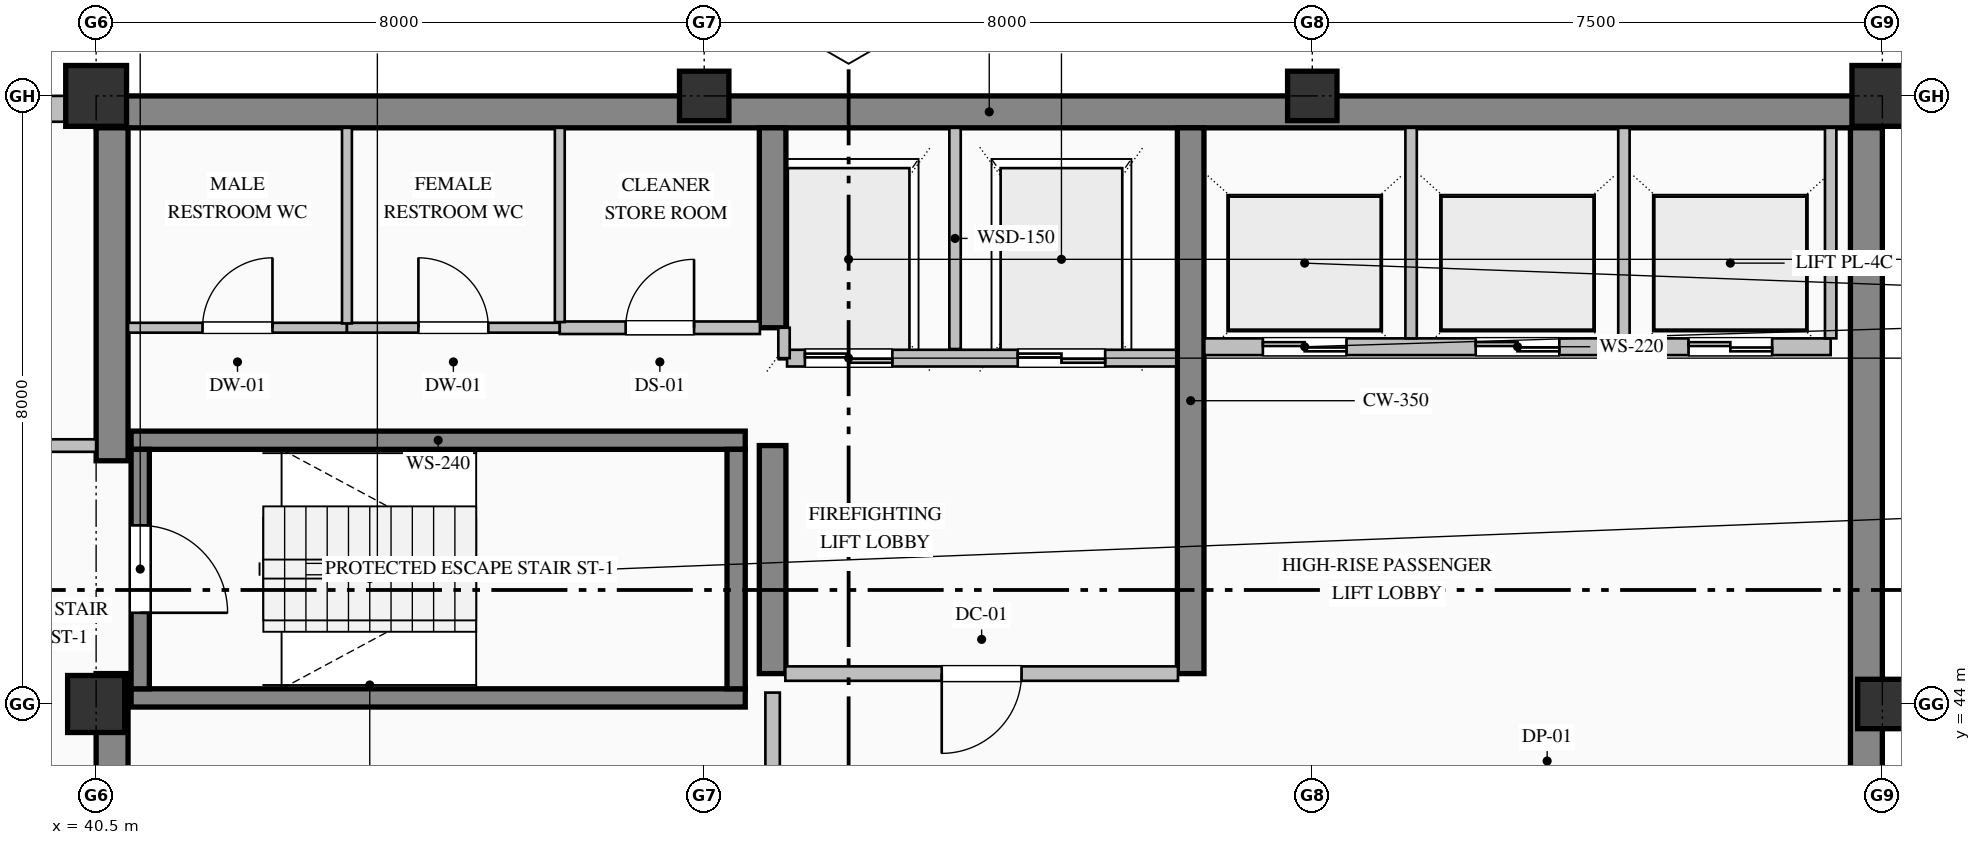
"""IFC4 building model, lengths in metres.
Left out: names, types, materials, properties, quantities, classifications, styles, units other than length and angle.
Written with IfcOpenShell. Run it as: python <this file> out.ifc"""

import sys

from ifc_helpers import new_model, si_unit, direction, frame, frame_2d, origin, origin_2d, place, context, subcontext, project, spatial, rectangle, hollow_rectangle, extrude, element, fill, save


model = new_model("IFC4")
c1 = context("Model", 3, precision=1e-05, world=origin(), true_north=direction((0.0, 1.0)))
c2 = subcontext(c1, "Body", "Model", "MODEL_VIEW")
j1 = project(units=[si_unit("LENGTHUNIT", "METRE"), si_unit("PLANEANGLEUNIT", "RADIAN")], contexts=[c1])
p1 = place(None, origin())
s1 = spatial("IfcSite", under=j1, at=p1, CompositionType="ELEMENT")
p2 = place(p1, origin())
s2 = spatial("IfcBuilding", under=s1, at=p2, CompositionType="ELEMENT")
p3 = place(p2, frame((0.0, 0.0, 287.2)))
s3 = spatial("IfcBuildingStorey", under=s2, at=p3, CompositionType="ELEMENT", Elevation=287.2)
p4 = place(p3, frame((40.5, 51.79, 0.0), z_axis=(0.0, 0.0, 1.0), x_axis=(1.0, 0.0, 0.0)))
e1 = element("IfcWall", 1, at=p4, inside=s3, PredefinedType="SHEAR", context=c2, shape_type="SweptSolid", body=[
    extrude(rectangle(XDim=23.5, YDim=0.42, at=frame_2d((11.75, 0.0))), origin(), (0.0, 0.0, 1.0), 3.785),
])
p5 = place(p3, frame((63.79, 36.32, 0.0), z_axis=(0.0, 0.0, 1.0), x_axis=(0.0, 1.0, 0.0)))
e2 = element("IfcWall", 2, at=p5, inside=s3, PredefinedType="SHEAR", context=c2, shape_type="SweptSolid", body=[
    extrude(rectangle(XDim=15.26, YDim=0.42, at=frame_2d((7.63, 0.0))), origin(), (0.0, 0.0, 1.0), 3.785),
])
p6 = place(p3, frame((40.71, 36.42, 0.0), z_axis=(0.0, 0.0, 1.0), x_axis=(0.0, 1.0, 0.0)))
e3 = element("IfcWall", 3, at=p6, inside=s3, PredefinedType="SHEAR", context=c2, shape_type="SweptSolid", body=[
    extrude(rectangle(XDim=7.98, YDim=0.42, at=frame_2d((3.99, 0.0))), origin(), (0.0, 0.0, 1.0), 3.785),
])
p7 = place(p3, frame((40.71, 47.2, 0.0), z_axis=(0.0, 0.0, 1.0), x_axis=(0.0, 1.0, 0.0)))
e4 = element("IfcWall", 4, at=p7, inside=s3, PredefinedType="SHEAR", context=c2, shape_type="SweptSolid", body=[
    extrude(rectangle(XDim=4.38, YDim=0.42, at=frame_2d((2.19, 0.0))), origin(), (0.0, 0.0, 1.0), 3.785),
])
p8 = place(p3, frame((49.4, 44.4, 0.0), z_axis=(0.0, 0.0, 1.0), x_axis=(0.0, 1.0, 0.0)))
e5 = element("IfcWall", 5, at=p8, inside=s3, PredefinedType="SHEAR", context=c2, shape_type="SweptSolid", body=[
    extrude(rectangle(XDim=3.0, YDim=0.35, at=frame_2d((1.5, 0.0))), origin(), (0.0, 0.0, 1.0), 3.785),
])
p9 = place(p3, frame((49.4, 48.95, 0.0), z_axis=(0.0, 0.0, 1.0), x_axis=(0.0, 1.0, 0.0)))
e6 = element("IfcWall", 6, at=p9, inside=s3, PredefinedType="SHEAR", context=c2, shape_type="SweptSolid", body=[
    extrude(rectangle(XDim=2.63, YDim=0.35, at=frame_2d((1.315, 0.0))), origin(), (0.0, 0.0, 1.0), 3.785),
])
p10 = place(p3, frame((54.9, 44.4, 0.0), z_axis=(0.0, 0.0, 1.0), x_axis=(0.0, 1.0, 0.0)))
e7 = element("IfcWall", 7, at=p10, inside=s3, PredefinedType="SHEAR", context=c2, shape_type="SweptSolid", body=[
    extrude(rectangle(XDim=7.18, YDim=0.35, at=frame_2d((3.59, 0.0))), origin(), (0.0, 0.0, 1.0), 3.785),
])
p11 = place(p3, frame((40.5, 44.0, 0.0), z_axis=(0.0, 0.0, 1.0), x_axis=(1.0, 0.0, 0.0)))
e8 = element("IfcColumn", 8, at=p11, inside=s3, PredefinedType="COLUMN", context=c2, shape_type="SweptSolid", body=[
    extrude(rectangle(XDim=0.75, YDim=0.75, at=origin_2d()), origin(), (0.0, 0.0, 1.0), 4.0),
])
p12 = place(p3, frame((40.5, 52.0, 0.0), z_axis=(0.0, 0.0, 1.0), x_axis=(1.0, 0.0, 0.0)))
e9 = element("IfcColumn", 9, at=p12, inside=s3, PredefinedType="COLUMN", context=c2, shape_type="SweptSolid", body=[
    extrude(hollow_rectangle(XDim=0.8, YDim=0.8, WallThickness=0.032, at=origin_2d()), origin(), (0.0, 0.0, 1.0), 4.0),
])
for number, where, z_axis, x_axis in (
    (10, (48.5, 52.0, 0.0), (0.0, 0.0, 1.0), (1.0, 0.0, 0.0)),
    (11, (56.5, 52.0, 0.0), (0.0, 0.0, 1.0), (1.0, 0.0, 0.0)),
    (12, (64.0, 44.0, 0.0), (0.0, 0.0, 1.0), (1.0, 0.0, 0.0)),
):
    element("IfcColumn", number, at=place(p3, frame(where, z_axis=z_axis, x_axis=x_axis)), inside=s3, PredefinedType="COLUMN", context=c2, shape_type="SweptSolid", body=[
        extrude(hollow_rectangle(XDim=0.65, YDim=0.65, WallThickness=0.028, at=origin_2d()), origin(), (0.0, 0.0, 1.0), 4.0),
    ])
p13 = place(p3, frame((64.0, 52.0, 0.0), z_axis=(0.0, 0.0, 1.0), x_axis=(1.0, 0.0, 0.0)))
e13 = element("IfcColumn", 13, at=p13, inside=s3, PredefinedType="COLUMN", context=c2, shape_type="SweptSolid", body=[
    extrude(hollow_rectangle(XDim=0.8, YDim=0.8, WallThickness=0.032, at=origin_2d()), origin(), (0.0, 0.0, 1.0), 4.0),
])
p14 = place(p3, frame((20.5, 51.83, 0.0), z_axis=(0.0, 0.0, 1.0), x_axis=(1.0, 0.0, 0.0)))
e14 = element("IfcWall", 14, at=p14, inside=s3, PredefinedType="SOLIDWALL", context=c2, shape_type="SweptSolid", body=[
    extrude(rectangle(XDim=20.02, YDim=0.34, at=frame_2d((10.01, 0.0))), origin(), (0.0, 0.0, 1.0), 3.335),
])
p15 = place(p14, frame((6.725, 0.0, 0.9)))
e15 = element("IfcOpeningElement", 15, at=p15, cuts=e14, PredefinedType="OPENING", context=c2, shape_type="SweptSolid", body=[
    extrude(rectangle(XDim=0.95, YDim=1.85, at=frame_2d((0.475, 0.925))), frame((0.0, 0.18, 0.0), z_axis=(0.0, -1.0, 0.0), x_axis=(1.0, 0.0, 0.0)), (0.0, 0.0, 1.0), 0.36),
])
for number, where, z_axis, x_axis in (
    (16, (40.96, 47.47, 0.0), (0.0, 0.0, 1.0), (1.0, 0.0, 0.0)),
    (17, (49.04, 44.08, 0.0), (0.0, 0.0, 1.0), (-1.0, 0.0, 0.0)),
):
    element("IfcWall", number, at=place(p3, frame(where, z_axis=z_axis, x_axis=x_axis)), inside=s3, PredefinedType="SOLIDWALL", context=c2, shape_type="SweptSolid", body=[
        extrude(rectangle(XDim=8.08, YDim=0.24, at=frame_2d((4.04, 0.0))), origin(), (0.0, 0.0, 1.0), 4.0),
    ])
p16 = place(p3, frame((41.08, 47.35, 0.0), z_axis=(0.0, 0.0, 1.0), x_axis=(0.0, -1.0, 0.0)))
e18 = element("IfcWall", 18, at=p16, inside=s3, PredefinedType="SOLIDWALL", context=c2, shape_type="SweptSolid", body=[
    extrude(rectangle(XDim=3.15, YDim=0.24, at=frame_2d((1.575, 0.0))), origin(), (0.0, 0.0, 1.0), 4.0),
])
p17 = place(p16, frame((1.0, 0.0, 0.0)))
e19 = element("IfcOpeningElement", 19, at=p17, cuts=e18, PredefinedType="OPENING", context=c2, shape_type="SweptSolid", body=[
    extrude(rectangle(XDim=1.15, YDim=2.2, at=frame_2d((0.575, 1.1))), frame((0.0, 0.13, 0.0), z_axis=(0.0, -1.0, 0.0), x_axis=(1.0, 0.0, 0.0)), (0.0, 0.0, 1.0), 0.26),
])
p18 = place(p3, frame((48.92, 44.2, 0.0), z_axis=(0.0, 0.0, 1.0), x_axis=(0.0, 1.0, 0.0)))
e20 = element("IfcWall", 20, at=p18, inside=s3, PredefinedType="SOLIDWALL", context=c2, shape_type="SweptSolid", body=[
    extrude(rectangle(XDim=3.15, YDim=0.24, at=frame_2d((1.575, 0.0))), origin(), (0.0, 0.0, 1.0), 4.0),
])
p19 = place(p3, frame((54.71, 48.55, 0.0), z_axis=(0.0, 0.0, 1.0), x_axis=(-1.0, 0.0, 0.0)))
e21 = element("IfcWall", 21, at=p19, inside=s3, PredefinedType="PARTITIONING", context=c2, shape_type="SweptSolid", body=[
    extrude(rectangle(XDim=5.12, YDim=0.22, at=frame_2d((2.56, 0.0))), origin(), (0.0, 0.0, 1.0), 3.785),
])
p20 = place(p19, frame((3.735, 0.0, 0.0)))
e22 = element("IfcOpeningElement", 22, at=p20, cuts=e21, PredefinedType="OPENING", context=c2, shape_type="SweptSolid", body=[
    extrude(rectangle(XDim=1.15, YDim=2.2, at=frame_2d((0.575, 1.1))), frame((0.0, 0.12, 0.0), z_axis=(0.0, -1.0, 0.0), x_axis=(1.0, 0.0, 0.0)), (0.0, 0.0, 1.0), 0.24),
])
p21 = place(p19, frame((0.935, 0.0, 0.0)))
e23 = element("IfcOpeningElement", 23, at=p21, cuts=e21, PredefinedType="OPENING", context=c2, shape_type="SweptSolid", body=[
    extrude(rectangle(XDim=1.15, YDim=2.2, at=frame_2d((0.575, 1.1))), frame((0.0, 0.12, 0.0), z_axis=(0.0, -1.0, 0.0), x_axis=(1.0, 0.0, 0.0)), (0.0, 0.0, 1.0), 0.24),
])
p22 = place(p3, frame((51.8, 48.67, 0.0), z_axis=(0.0, 0.0, 1.0), x_axis=(0.0, 1.0, 0.0)))
e24 = element("IfcWall", 24, at=p22, inside=s3, PredefinedType="PARTITIONING", context=c2, shape_type="SweptSolid", body=[
    extrude(rectangle(XDim=2.91, YDim=0.15, at=frame_2d((1.455, 0.0))), origin(), (0.0, 0.0, 1.0), 3.785),
])
p23 = place(p3, frame((49.55, 48.55, 0.0), z_axis=(0.0, 0.0, 1.0), x_axis=(0.0, 1.0, 0.0)))
e25 = element("IfcWall", 25, at=p23, inside=s3, PredefinedType="PARTITIONING", context=c2, shape_type="SweptSolid", body=[
    extrude(rectangle(XDim=0.4, YDim=0.15, at=frame_2d((0.2, 0.0))), origin(), (0.0, 0.0, 1.0), 3.785),
])
p24 = place(p3, frame((63.32, 48.7, 0.0), z_axis=(0.0, 0.0, 1.0), x_axis=(-1.0, 0.0, 0.0)))
e26 = element("IfcWall", 26, at=p24, inside=s3, PredefinedType="PARTITIONING", context=c2, shape_type="SweptSolid", body=[
    extrude(rectangle(XDim=8.24, YDim=0.22, at=frame_2d((4.12, 0.0))), origin(), (0.0, 0.0, 1.0), 3.785),
])
p25 = place(p24, frame((6.37, 0.0, 0.0)))
e27 = element("IfcOpeningElement", 27, at=p25, cuts=e26, PredefinedType="OPENING", context=c2, shape_type="SweptSolid", body=[
    extrude(rectangle(XDim=1.1, YDim=2.2, at=frame_2d((0.55, 1.1))), frame((0.0, 0.12, 0.0), z_axis=(0.0, -1.0, 0.0), x_axis=(1.0, 0.0, 0.0)), (0.0, 0.0, 1.0), 0.24),
])
p26 = place(p24, frame((3.57, 0.0, 0.0)))
e28 = element("IfcOpeningElement", 28, at=p26, cuts=e26, PredefinedType="OPENING", context=c2, shape_type="SweptSolid", body=[
    extrude(rectangle(XDim=1.1, YDim=2.2, at=frame_2d((0.55, 1.1))), frame((0.0, 0.12, 0.0), z_axis=(0.0, -1.0, 0.0), x_axis=(1.0, 0.0, 0.0)), (0.0, 0.0, 1.0), 0.24),
])
p27 = place(p24, frame((0.77, 0.0, 0.0)))
e29 = element("IfcOpeningElement", 29, at=p27, cuts=e26, PredefinedType="OPENING", context=c2, shape_type="SweptSolid", body=[
    extrude(rectangle(XDim=1.1, YDim=2.2, at=frame_2d((0.55, 1.1))), frame((0.0, 0.12, 0.0), z_axis=(0.0, -1.0, 0.0), x_axis=(1.0, 0.0, 0.0)), (0.0, 0.0, 1.0), 0.24),
])
for number, where, z_axis, x_axis in (
    (30, (57.8, 48.81, 0.0), (0.0, 0.0, 1.0), (0.0, 1.0, 0.0)),
    (31, (60.6, 48.81, 0.0), (0.0, 0.0, 1.0), (0.0, 1.0, 0.0)),
    (32, (63.32, 48.81, 0.0), (0.0, 0.0, 1.0), (0.0, 1.0, 0.0)),
):
    element("IfcWall", number, at=place(p3, frame(where, z_axis=z_axis, x_axis=x_axis)), inside=s3, PredefinedType="PARTITIONING", context=c2, shape_type="SweptSolid", body=[
        extrude(rectangle(XDim=2.77, YDim=0.15, at=frame_2d((1.385, 0.0))), origin(), (0.0, 0.0, 1.0), 3.785),
    ])
p28 = place(p3, frame((37.8, 47.4, 0.0), z_axis=(0.0, 0.0, 1.0), x_axis=(1.0, 0.0, 0.0)))
e33 = element("IfcWall", 33, at=p28, inside=s3, PredefinedType="PARTITIONING", context=c2, shape_type="SweptSolid", body=[
    extrude(rectangle(XDim=2.7, YDim=0.165, at=frame_2d((1.35, 0.0))), origin(), (0.0, 0.0, 1.0), 3.785),
])
p29 = place(p28, frame((0.825, 0.0, 0.0)))
e34 = element("IfcOpeningElement", 34, at=p29, cuts=e33, PredefinedType="OPENING", context=c2, shape_type="SweptSolid", body=[
    extrude(rectangle(XDim=1.05, YDim=2.15, at=frame_2d((0.525, 1.075))), frame((0.0, 0.093, 0.0), z_axis=(0.0, -1.0, 0.0), x_axis=(1.0, 0.0, 0.0)), (0.0, 0.0, 1.0), 0.185),
])
p30 = place(p3, frame((40.92, 48.95, 0.0), z_axis=(0.0, 0.0, 1.0), x_axis=(1.0, 0.0, 0.0)))
e35 = element("IfcWall", 35, at=p30, inside=s3, PredefinedType="PARTITIONING", context=c2, shape_type="SweptSolid", body=[
    extrude(rectangle(XDim=2.88, YDim=0.13, at=frame_2d((1.44, 0.0))), origin(), (0.0, 0.0, 1.0), 3.785),
])
p31 = place(p30, frame((0.98, 0.0, 0.0)))
e36 = element("IfcOpeningElement", 36, at=p31, cuts=e35, PredefinedType="OPENING", context=c2, shape_type="SweptSolid", body=[
    extrude(rectangle(XDim=0.92, YDim=2.15, at=frame_2d((0.46, 1.075))), frame((0.0, 0.075, 0.0), z_axis=(0.0, -1.0, 0.0), x_axis=(1.0, 0.0, 0.0)), (0.0, 0.0, 1.0), 0.15),
])
p32 = place(p3, frame((43.8, 48.95, 0.0), z_axis=(0.0, 0.0, 1.0), x_axis=(1.0, 0.0, 0.0)))
e37 = element("IfcWall", 37, at=p32, inside=s3, PredefinedType="PARTITIONING", context=c2, shape_type="SweptSolid", body=[
    extrude(rectangle(XDim=2.8, YDim=0.13, at=frame_2d((1.4, 0.0))), origin(), (0.0, 0.0, 1.0), 3.785),
])
p33 = place(p32, frame((0.94, 0.0, 0.0)))
e38 = element("IfcOpeningElement", 38, at=p33, cuts=e37, PredefinedType="OPENING", context=c2, shape_type="SweptSolid", body=[
    extrude(rectangle(XDim=0.92, YDim=2.15, at=frame_2d((0.46, 1.075))), frame((0.0, 0.075, 0.0), z_axis=(0.0, -1.0, 0.0), x_axis=(1.0, 0.0, 0.0)), (0.0, 0.0, 1.0), 0.15),
])
p34 = place(p3, frame((46.6, 48.95, 0.0), z_axis=(0.0, 0.0, 1.0), x_axis=(1.0, 0.0, 0.0)))
e39 = element("IfcWall", 39, at=p34, inside=s3, PredefinedType="PARTITIONING", context=c2, shape_type="SweptSolid", body=[
    extrude(rectangle(XDim=2.633, YDim=0.165, at=frame_2d((1.316, 0.0))), origin(), (0.0, 0.0, 1.0), 3.785),
])
p35 = place(p34, frame((0.866, 0.0, 0.0)))
e40 = element("IfcOpeningElement", 40, at=p35, cuts=e39, PredefinedType="OPENING", context=c2, shape_type="SweptSolid", body=[
    extrude(rectangle(XDim=0.9, YDim=2.15, at=frame_2d((0.45, 1.075))), frame((0.0, 0.093, 0.0), z_axis=(0.0, -1.0, 0.0), x_axis=(1.0, 0.0, 0.0)), (0.0, 0.0, 1.0), 0.185),
])
p36 = place(p3, frame((54.733, 44.4, 0.0), z_axis=(0.0, 0.0, 1.0), x_axis=(-1.0, 0.0, 0.0)))
e41 = element("IfcWall", 41, at=p36, inside=s3, PredefinedType="PARTITIONING", context=c2, shape_type="SweptSolid", body=[
    extrude(rectangle(XDim=5.166, YDim=0.19, at=frame_2d((2.583, 0.0))), origin(), (0.0, 0.0, 1.0), 3.785),
])
p37 = place(p36, frame((2.058, 0.0, 0.0)))
e42 = element("IfcOpeningElement", 42, at=p37, cuts=e41, PredefinedType="OPENING", context=c2, shape_type="SweptSolid", body=[
    extrude(rectangle(XDim=1.05, YDim=2.15, at=frame_2d((0.525, 1.075))), frame((0.0, 0.105, 0.0), z_axis=(0.0, -1.0, 0.0), x_axis=(1.0, 0.0, 0.0)), (0.0, 0.0, 1.0), 0.21),
])
p38 = place(p3, frame((49.4, 40.487, 0.0), z_axis=(0.0, 0.0, 1.0), x_axis=(0.0, 1.0, 0.0)))
e43 = element("IfcWall", 43, at=p38, inside=s3, PredefinedType="PARTITIONING", context=c2, shape_type="SweptSolid", body=[
    extrude(rectangle(XDim=3.663, YDim=0.19, at=frame_2d((1.832, 0.0))), origin(), (0.0, 0.0, 1.0), 3.027),
])
p39 = place(p38, frame((1.132, 0.0, 0.0)))
e44 = element("IfcOpeningElement", 44, at=p39, cuts=e43, PredefinedType="OPENING", context=c2, shape_type="SweptSolid", body=[
    extrude(rectangle(XDim=1.4, YDim=2.25, at=frame_2d((0.7, 1.125))), frame((0.0, 0.105, 0.0), z_axis=(0.0, -1.0, 0.0), x_axis=(1.0, 0.0, 0.0)), (0.0, 0.0, 1.0), 0.21),
])
p40 = place(p3, frame((43.8, 51.58, 0.0), z_axis=(0.0, 0.0, 1.0), x_axis=(0.0, -1.0, 0.0)))
e45 = element("IfcWall", 45, at=p40, inside=s3, PredefinedType="PARTITIONING", context=c2, shape_type="SweptSolid", body=[
    extrude(rectangle(XDim=2.573, YDim=0.13, at=frame_2d((1.287, 0.0))), origin(), (0.0, 0.0, 1.0), 3.785),
])
p41 = place(p3, frame((46.6, 51.58, 0.0), z_axis=(0.0, 0.0, 1.0), x_axis=(0.0, -1.0, 0.0)))
e46 = element("IfcWall", 46, at=p41, inside=s3, PredefinedType="PARTITIONING", context=c2, shape_type="SweptSolid", body=[
    extrude(rectangle(XDim=2.556, YDim=0.13, at=frame_2d((1.278, 0.0))), origin(), (0.0, 0.0, 1.0), 3.785),
])
p42 = place(p17, origin())
e47 = element("IfcDoor", 47, at=p42, inside=s3, OperationType="SINGLE_SWING_RIGHT", PredefinedType="DOOR", context=c2, shape_type="SweptSolid", body=[
    extrude(rectangle(XDim=1.15, YDim=2.2, at=frame_2d((0.575, 1.1))), frame((0.0, 0.025, 0.0), z_axis=(0.0, -1.0, 0.0), x_axis=(1.0, 0.0, 0.0)), (0.0, 0.0, 1.0), 0.05),
])
fill(e19, e47)
p43 = place(p20, origin())
e48 = element("IfcDoor", 48, at=p43, inside=s3, OperationType="DOUBLE_DOOR_SLIDING", PredefinedType="DOOR", context=c2, shape_type="SweptSolid", body=[
    extrude(rectangle(XDim=1.15, YDim=2.2, at=frame_2d((0.575, 1.1))), frame((0.0, 0.025, 0.0), z_axis=(0.0, -1.0, 0.0), x_axis=(1.0, 0.0, 0.0)), (0.0, 0.0, 1.0), 0.05),
])
fill(e22, e48)
p44 = place(p21, origin())
e49 = element("IfcDoor", 49, at=p44, inside=s3, OperationType="DOUBLE_DOOR_SLIDING", PredefinedType="DOOR", context=c2, shape_type="SweptSolid", body=[
    extrude(rectangle(XDim=1.15, YDim=2.2, at=frame_2d((0.575, 1.1))), frame((0.0, 0.025, 0.0), z_axis=(0.0, -1.0, 0.0), x_axis=(1.0, 0.0, 0.0)), (0.0, 0.0, 1.0), 0.05),
])
fill(e23, e49)
p45 = place(p25, origin())
e50 = element("IfcDoor", 50, at=p45, inside=s3, OperationType="DOUBLE_DOOR_SLIDING", PredefinedType="DOOR", context=c2, shape_type="SweptSolid", body=[
    extrude(rectangle(XDim=1.1, YDim=2.2, at=frame_2d((0.55, 1.1))), frame((0.0, 0.025, 0.0), z_axis=(0.0, -1.0, 0.0), x_axis=(1.0, 0.0, 0.0)), (0.0, 0.0, 1.0), 0.05),
])
fill(e27, e50)
p46 = place(p26, origin())
e51 = element("IfcDoor", 51, at=p46, inside=s3, OperationType="DOUBLE_DOOR_SLIDING", PredefinedType="DOOR", context=c2, shape_type="SweptSolid", body=[
    extrude(rectangle(XDim=1.1, YDim=2.2, at=frame_2d((0.55, 1.1))), frame((0.0, 0.025, 0.0), z_axis=(0.0, -1.0, 0.0), x_axis=(1.0, 0.0, 0.0)), (0.0, 0.0, 1.0), 0.05),
])
fill(e28, e51)
p47 = place(p27, origin())
e52 = element("IfcDoor", 52, at=p47, inside=s3, OperationType="DOUBLE_DOOR_SLIDING", PredefinedType="DOOR", context=c2, shape_type="SweptSolid", body=[
    extrude(rectangle(XDim=1.1, YDim=2.2, at=frame_2d((0.55, 1.1))), frame((0.0, 0.025, 0.0), z_axis=(0.0, -1.0, 0.0), x_axis=(1.0, 0.0, 0.0)), (0.0, 0.0, 1.0), 0.05),
])
fill(e29, e52)
p48 = place(p37, origin())
e53 = element("IfcDoor", 53, at=p48, inside=s3, OperationType="SINGLE_SWING_RIGHT", PredefinedType="DOOR", context=c2, shape_type="SweptSolid", body=[
    extrude(rectangle(XDim=1.05, YDim=2.15, at=frame_2d((0.525, 1.075))), frame((0.0, 0.025, 0.0), z_axis=(0.0, -1.0, 0.0), x_axis=(1.0, 0.0, 0.0)), (0.0, 0.0, 1.0), 0.05),
])
fill(e42, e53)
p49 = place(p31, origin())
e54 = element("IfcDoor", 54, at=p49, inside=s3, OperationType="SINGLE_SWING_RIGHT", PredefinedType="DOOR", context=c2, shape_type="SweptSolid", body=[
    extrude(rectangle(XDim=0.92, YDim=2.15, at=frame_2d((0.46, 1.075))), frame((0.0, 0.025, 0.0), z_axis=(0.0, -1.0, 0.0), x_axis=(1.0, 0.0, 0.0)), (0.0, 0.0, 1.0), 0.05),
])
fill(e36, e54)
p50 = place(p33, origin())
e55 = element("IfcDoor", 55, at=p50, inside=s3, OperationType="SINGLE_SWING_LEFT", PredefinedType="DOOR", context=c2, shape_type="SweptSolid", body=[
    extrude(rectangle(XDim=0.92, YDim=2.15, at=frame_2d((0.46, 1.075))), frame((0.0, 0.025, 0.0), z_axis=(0.0, -1.0, 0.0), x_axis=(1.0, 0.0, 0.0)), (0.0, 0.0, 1.0), 0.05),
])
fill(e38, e55)
p51 = place(p35, origin())
e56 = element("IfcDoor", 56, at=p51, inside=s3, OperationType="SINGLE_SWING_RIGHT", PredefinedType="DOOR", context=c2, shape_type="SweptSolid", body=[
    extrude(rectangle(XDim=0.9, YDim=2.15, at=frame_2d((0.45, 1.075))), frame((0.0, 0.025, 0.0), z_axis=(0.0, -1.0, 0.0), x_axis=(1.0, 0.0, 0.0)), (0.0, 0.0, 1.0), 0.05),
])
fill(e40, e56)
save(model, sys.argv[1])
